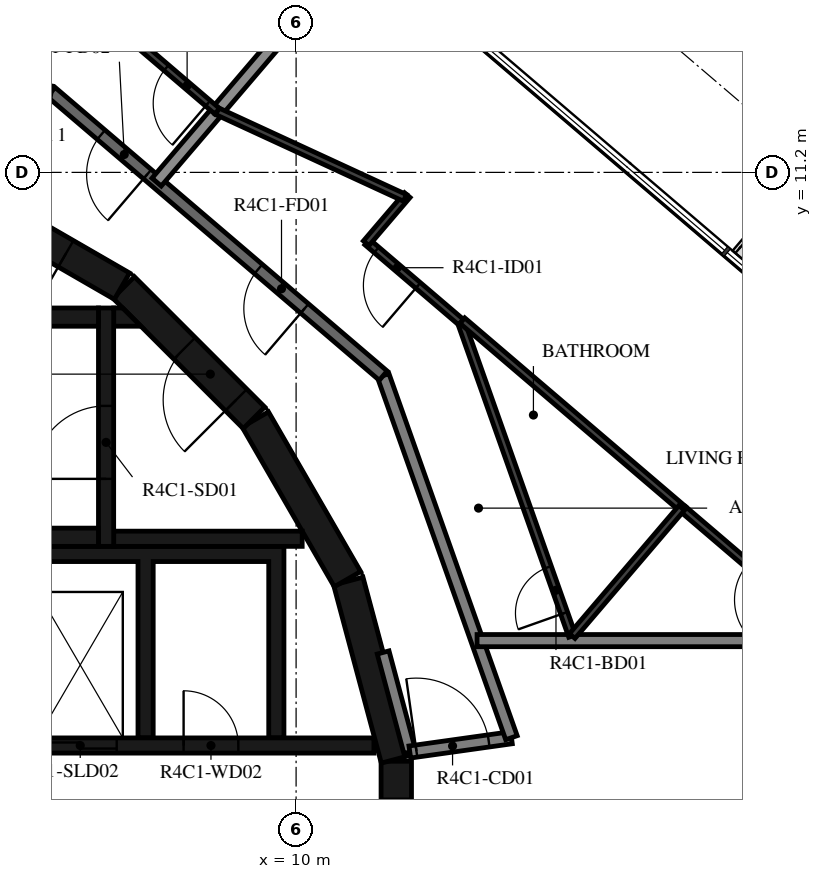
"""IFC4 building model, lengths in metres.
Left out: names, types, materials, properties, quantities, classifications, styles, units other than length and angle.
Written with IfcOpenShell. Run it as: python <this file> out.ifc"""

import sys

from ifc_helpers import new_model, si_unit, direction, frame, frame_2d, origin, place, context, subcontext, project, spatial, polyline, rectangle, outline, extrude, element, fill, save


model = new_model("IFC4")
c1 = context("Model", 3, precision=1e-05, world=origin(), true_north=direction((0.0, 1.0)))
c2 = subcontext(c1, "Body", "Model", "MODEL_VIEW")
j1 = project(units=[si_unit("LENGTHUNIT", "METRE"), si_unit("PLANEANGLEUNIT", "RADIAN")], contexts=[c1])
p1 = place(None, origin())
s1 = spatial("IfcSite", under=j1, at=p1, CompositionType="ELEMENT")
p2 = place(p1, origin())
s2 = spatial("IfcBuilding", under=s1, at=p2, CompositionType="ELEMENT")
p3 = place(p2, frame((0.0, 0.0, 176.2)))
s3 = spatial("IfcBuildingStorey", under=s2, at=p3, CompositionType="ELEMENT", Elevation=176.2)
p4 = place(p3, frame((11.647, -1.516, 0.0), z_axis=(0.0, 0.0, 1.0), x_axis=(0.0, 1.0, 0.0)))
e1 = element("IfcWall", 1, at=p4, inside=s3, PredefinedType="SHEAR", context=c2, shape_type="SweptSolid", body=[
    extrude(rectangle(XDim=3.033, YDim=0.5, at=frame_2d((1.516, 0.0))), origin(), (0.0, 0.0, 1.0), 3.12),
])
p5 = place(p4, frame((0.616, 0.0, 0.0)))
e2 = element("IfcOpeningElement", 2, at=p5, cuts=e1, PredefinedType="OPENING", context=c2, shape_type="SweptSolid", body=[
    extrude(rectangle(XDim=1.8, YDim=2.1, at=frame_2d((0.9, 1.05))), frame((0.0, 0.26, 0.0), z_axis=(0.0, -1.0, 0.0), x_axis=(1.0, 0.0, 0.0)), (0.0, 0.0, 1.0), 0.52),
])
for number, where, z_axis, x_axis in (
    (3, (11.643, 1.55, 0.0), (0.0, 0.0, 1.0), (-0.259, 0.966, 0.0)),
    (4, (10.845, 4.51, 0.0), (0.0, 0.0, 1.0), (-0.5, 0.866, 0.0)),
):
    element("IfcWall", number, at=place(p3, frame(where, z_axis=z_axis, x_axis=x_axis)), inside=s3, PredefinedType="SHEAR", context=c2, shape_type="SweptSolid", body=[
        extrude(rectangle(XDim=3.033, YDim=0.5, at=frame_2d((1.516, 0.0))), origin(), (0.0, 0.0, 1.0), 3.12),
    ])
p6 = place(p3, frame((9.308, 7.164, 0.0), z_axis=(0.0, 0.0, 1.0), x_axis=(-0.707106781187, 0.707106781187, 0.0)))
e5 = element("IfcWall", 5, at=p6, inside=s3, PredefinedType="SHEAR", context=c2, shape_type="SweptSolid", body=[
    extrude(rectangle(XDim=3.032, YDim=0.5, at=frame_2d((1.516, 0.0))), origin(), (0.0, 0.0, 1.0), 3.12),
])
p7 = place(p6, frame((0.416, 0.0, 0.0)))
e6 = element("IfcOpeningElement", 6, at=p7, cuts=e5, PredefinedType="OPENING", context=c2, shape_type="SweptSolid", body=[
    extrude(rectangle(XDim=1.2, YDim=2.1, at=frame_2d((0.6, 1.05))), frame((0.0, 0.26, 0.0), z_axis=(0.0, -1.0, 0.0), x_axis=(1.0, 0.0, 0.0)), (0.0, 0.0, 1.0), 0.52),
])
p8 = place(p3, frame((7.137, 9.329, 0.0), z_axis=(0.0, 0.0, 1.0), x_axis=(-0.865975092491, 0.500087131594, 0.0)))
e7 = element("IfcWall", 7, at=p8, inside=s3, PredefinedType="SHEAR", context=c2, shape_type="SweptSolid", body=[
    extrude(rectangle(XDim=3.033, YDim=0.5, at=frame_2d((1.516, 0.0))), origin(), (0.0, 0.0, 1.0), 3.12),
])
p9 = place(p8, frame((1.066, 0.0, 0.0)))
e8 = element("IfcOpeningElement", 8, at=p9, cuts=e7, PredefinedType="OPENING", context=c2, shape_type="SweptSolid", body=[
    extrude(rectangle(XDim=0.9, YDim=2.1, at=frame_2d((0.45, 1.05))), frame((0.0, 0.26, 0.0), z_axis=(0.0, -1.0, 0.0), x_axis=(1.0, 0.0, 0.0)), (0.0, 0.0, 1.0), 0.52),
])
for number, where, z_axis, x_axis in (
    (9, (0.0, 5.2, 0.0), (0.0, 0.0, 1.0), (1.0, 0.0, 0.0)),
    (10, (0.0, 8.82, 0.0), (0.0, 0.0, 1.0), (1.0, 0.0, 0.0)),
):
    element("IfcWall", number, at=place(p3, frame(where, z_axis=z_axis, x_axis=x_axis)), inside=s3, PredefinedType="SHEAR", context=c2, shape_type="SweptSolid", body=[
        extrude(rectangle(XDim=6.75, YDim=0.3, at=frame_2d((3.375, 0.0))), origin(), (0.0, 0.0, 1.0), 3.12),
    ])
p10 = place(p3, frame((6.875, 5.05, 0.0), z_axis=(0.0, 0.0, 1.0), x_axis=(0.0, 1.0, 0.0)))
e11 = element("IfcWall", 11, at=p10, inside=s3, PredefinedType="SHEAR", context=c2, shape_type="SweptSolid", body=[
    extrude(rectangle(XDim=3.92, YDim=0.25, at=frame_2d((1.96, 0.0))), origin(), (0.0, 0.0, 1.0), 3.12),
])
p11 = place(p10, frame((1.11, 0.0, 0.0)))
e12 = element("IfcOpeningElement", 12, at=p11, cuts=e11, PredefinedType="OPENING", context=c2, shape_type="SweptSolid", body=[
    extrude(rectangle(XDim=1.2, YDim=2.1, at=frame_2d((0.6, 1.05))), frame((0.0, 0.135, 0.0), z_axis=(0.0, -1.0, 0.0), x_axis=(1.0, 0.0, 0.0)), (0.0, 0.0, 1.0), 0.27),
])
p12 = place(p3, frame((7.0, 5.175, 0.0), z_axis=(0.0, 0.0, 1.0), x_axis=(1.0, 0.0, 0.0)))
e13 = element("IfcWall", 13, at=p12, inside=s3, PredefinedType="SHEAR", context=c2, shape_type="SweptSolid", body=[
    extrude(rectangle(XDim=3.1, YDim=0.25, at=frame_2d((1.55, 0.0))), origin(), (0.0, 0.0, 1.0), 3.12),
])
p13 = place(p3, origin())
e14 = element("IfcWall", 14, at=p13, inside=s3, PredefinedType="SHEAR", context=c2, shape_type="SweptSolid", body=[
    extrude(outline(polyline([(7.448, 8.67), (7.0, 8.67), (7.0, 8.97), (7.148, 8.97), (7.448, 8.67)])), origin(), (0.0, 0.0, 1.0), 3.12),
])
p14 = place(p3, origin())
e15 = element("IfcWall", 15, at=p14, inside=s3, PredefinedType="SHEAR", context=c2, shape_type="SweptSolid", body=[
    extrude(outline(polyline([(-9.55, 4.8), (-1.2, 4.8), (-1.2, 1.9), (-0.95, 1.9), (-0.95, 4.8), (0.95, 4.8), (0.95, 1.9), (1.2, 1.9), (1.2, 4.8), (3.1, 4.8), (3.1, 1.9), (3.35, 1.9), (3.35, 4.8), (5.25, 4.8), (5.25, 1.9), (5.5, 1.9), (5.5, 4.8), (7.4, 4.8), (7.4, 1.9), (7.65, 1.9), (7.65, 4.8), (9.55, 4.8), (9.55, 1.9), (9.8, 1.9), (9.8, 4.8), (9.8, 5.05), (-9.8, 5.05), (-9.8, 4.8), (-9.8, 1.9), (-9.55, 1.9), (-9.55, 4.8)])), origin(), (0.0, 0.0, 1.0), 3.12),
])
p15 = place(p3, frame((3.35, 1.775, 0.0), z_axis=(0.0, 0.0, 1.0), x_axis=(1.0, 0.0, 0.0)))
e16 = element("IfcWall", 16, at=p15, inside=s3, PredefinedType="SHEAR", context=c2, shape_type="SweptSolid", body=[
    extrude(rectangle(XDim=7.93, YDim=0.25, at=frame_2d((3.965, 0.0))), origin(), (0.0, 0.0, 1.0), 3.12),
])
p16 = place(p15, frame((0.35, 0.0, 0.0)))
e17 = element("IfcOpeningElement", 17, at=p16, cuts=e16, PredefinedType="OPENING", context=c2, shape_type="SweptSolid", body=[
    extrude(rectangle(XDim=1.2, YDim=2.4, at=frame_2d((0.6, 1.2))), frame((0.0, 0.135, 0.0), z_axis=(0.0, -1.0, 0.0), x_axis=(1.0, 0.0, 0.0)), (0.0, 0.0, 1.0), 0.27),
])
p17 = place(p15, frame((2.5, 0.0, 0.0)))
e18 = element("IfcOpeningElement", 18, at=p17, cuts=e16, PredefinedType="OPENING", context=c2, shape_type="SweptSolid", body=[
    extrude(rectangle(XDim=1.2, YDim=2.4, at=frame_2d((0.6, 1.2))), frame((0.0, 0.135, 0.0), z_axis=(0.0, -1.0, 0.0), x_axis=(1.0, 0.0, 0.0)), (0.0, 0.0, 1.0), 0.27),
])
p18 = place(p15, frame((4.8, 0.0, 0.0)))
e19 = element("IfcOpeningElement", 19, at=p18, cuts=e16, PredefinedType="OPENING", context=c2, shape_type="SweptSolid", body=[
    extrude(rectangle(XDim=0.9, YDim=2.1, at=frame_2d((0.45, 1.05))), frame((0.0, 0.135, 0.0), z_axis=(0.0, -1.0, 0.0), x_axis=(1.0, 0.0, 0.0)), (0.0, 0.0, 1.0), 0.27),
])
p19 = place(p3, frame((11.87, 1.668, 0.0), z_axis=(0.0, 0.0, 1.0), x_axis=(-0.258836880648, 0.965921047093, 0.0)))
e20 = element("IfcWall", 20, at=p19, inside=s3, PredefinedType="STANDARD", context=c2, shape_type="SweptSolid", body=[
    extrude(rectangle(XDim=1.695, YDim=0.2, at=frame_2d((0.848, 0.0))), origin(), (0.0, 0.0, 1.0), 3.12),
])
p20 = place(p3, frame((11.87, 1.668, 0.0), z_axis=(0.0, 0.0, 1.0), x_axis=(0.990270910415, 0.139152879904, 0.0)))
e21 = element("IfcWall", 21, at=p20, inside=s3, PredefinedType="STANDARD", context=c2, shape_type="SweptSolid", body=[
    extrude(rectangle(XDim=1.688, YDim=0.2, at=frame_2d((0.844, 0.0))), origin(), (0.0, 0.0, 1.0), 3.12),
])
p21 = place(p20, frame((0.11, 0.0, 0.0)))
e22 = element("IfcOpeningElement", 22, at=p21, cuts=e21, PredefinedType="OPENING", context=c2, shape_type="SweptSolid", body=[
    extrude(rectangle(XDim=1.2, YDim=2.1, at=frame_2d((0.6, 1.05))), frame((0.0, 0.11, 0.0), z_axis=(0.0, -1.0, 0.0), x_axis=(1.0, 0.0, 0.0)), (0.0, 0.0, 1.0), 0.22),
])
p22 = place(p3, frame((13.542, 1.903, 0.0), z_axis=(0.0, 0.0, 1.0), x_axis=(-0.333808508206, 0.942640907159, 0.0)))
e23 = element("IfcWall", 23, at=p22, inside=s3, PredefinedType="STANDARD", context=c2, shape_type="SweptSolid", body=[
    extrude(rectangle(XDim=6.317, YDim=0.2, at=frame_2d((3.158, 0.0))), origin(), (0.0, 0.0, 1.0), 3.12),
])
p23 = place(p3, frame((11.433, 7.858, 0.0), z_axis=(0.0, 0.0, 1.0), x_axis=(-0.760412154545, 0.649440801937, 0.0)))
e24 = element("IfcWall", 24, at=p23, inside=s3, PredefinedType="STANDARD", context=c2, shape_type="SweptSolid", body=[
    extrude(rectangle(XDim=7.181, YDim=0.2, at=frame_2d((3.59, 0.0))), origin(), (0.0, 0.0, 1.0), 3.12),
])
p24 = place(p23, frame((1.7, 0.0, 0.0)))
e25 = element("IfcOpeningElement", 25, at=p24, cuts=e24, PredefinedType="OPENING", context=c2, shape_type="SweptSolid", body=[
    extrude(rectangle(XDim=1.0, YDim=2.1, at=frame_2d((0.5, 1.05))), frame((0.0, 0.11, 0.0), z_axis=(0.0, -1.0, 0.0), x_axis=(1.0, 0.0, 0.0)), (0.0, 0.0, 1.0), 0.22),
])
p25 = place(p23, frame((5.101, 0.0, 0.0)))
e26 = element("IfcOpeningElement", 26, at=p25, cuts=e24, PredefinedType="OPENING", context=c2, shape_type="SweptSolid", body=[
    extrude(rectangle(XDim=1.0, YDim=2.1, at=frame_2d((0.5, 1.05))), frame((0.0, 0.11, 0.0), z_axis=(0.0, -1.0, 0.0), x_axis=(1.0, 0.0, 0.0)), (0.0, 0.0, 1.0), 0.22),
])
p26 = place(p3, frame((17.9, 3.5, 0.0), z_axis=(0.0, 0.0, 1.0), x_axis=(-1.0, 0.0, 0.0)))
e27 = element("IfcWall", 27, at=p26, inside=s3, PredefinedType="STANDARD", context=c2, shape_type="SweptSolid", body=[
    extrude(rectangle(XDim=4.924, YDim=0.2, at=frame_2d((2.462, 0.0))), origin(), (0.0, 0.0, 1.0), 3.12),
])
p27 = place(p3, frame((11.04, 14.943, 0.0), z_axis=(0.0, 0.0, 1.0), x_axis=(-0.649442880087, -0.760410379666, 0.0)))
e28 = element("IfcWall", 28, at=p27, inside=s3, PredefinedType="STANDARD", context=c2, shape_type="SweptSolid", body=[
    extrude(rectangle(XDim=5.133, YDim=0.2, at=frame_2d((2.566, 0.0))), origin(), (0.0, 0.0, 1.0), 2.73),
])
p28 = place(p3, frame((14.541, 3.575, 0.0), z_axis=(0.0, 0.0, 1.0), x_axis=(-0.333799280318, 0.942644174893, 0.0)))
e29 = element("IfcWall", 29, at=p28, inside=s3, PredefinedType="PARTITIONING", context=c2, shape_type="SweptSolid", body=[
    extrude(rectangle(XDim=5.477, YDim=0.12, at=frame_2d((2.738, 0.0))), origin(), (0.0, 0.0, 1.0), 3.12),
])
p29 = place(p28, frame((0.4, 0.0, 0.0)))
e30 = element("IfcOpeningElement", 30, at=p29, cuts=e29, PredefinedType="OPENING", context=c2, shape_type="SweptSolid", body=[
    extrude(rectangle(XDim=0.8, YDim=2.1, at=frame_2d((0.4, 1.05))), frame((0.0, 0.07, 0.0), z_axis=(0.0, -1.0, 0.0), x_axis=(1.0, 0.0, 0.0)), (0.0, 0.0, 1.0), 0.14),
])
p30 = place(p3, frame((12.713, 8.737, 0.0), z_axis=(0.0, 0.0, 1.0), x_axis=(-0.760410825807, 0.649442357716, 0.0)))
e31 = element("IfcWall", 31, at=p30, inside=s3, PredefinedType="PARTITIONING", context=c2, shape_type="SweptSolid", body=[
    extrude(rectangle(XDim=2.029, YDim=0.12, at=frame_2d((1.014, 0.0))), origin(), (0.0, 0.0, 1.0), 3.12),
])
p31 = place(p30, frame((0.929, 0.0, 0.0)))
e32 = element("IfcOpeningElement", 32, at=p31, cuts=e31, PredefinedType="OPENING", context=c2, shape_type="SweptSolid", body=[
    extrude(rectangle(XDim=0.9, YDim=2.1, at=frame_2d((0.45, 1.05))), frame((0.0, 0.07, 0.0), z_axis=(0.0, -1.0, 0.0), x_axis=(1.0, 0.0, 0.0)), (0.0, 0.0, 1.0), 0.14),
])
p32 = place(p3, frame((12.734, 8.762, 0.0), z_axis=(0.0, 0.0, 1.0), x_axis=(0.760390484255, -0.649466174219, 0.0)))
e33 = element("IfcWall", 33, at=p32, inside=s3, PredefinedType="PARTITIONING", context=c2, shape_type="SweptSolid", body=[
    extrude(rectangle(XDim=4.783, YDim=0.12, at=frame_2d((2.391, 0.0))), origin(), (0.0, 0.0, 1.0), 3.12),
])
p33 = place(p3, frame((11.153, 10.034, 0.0), z_axis=(0.0, 0.0, 1.0), x_axis=(0.649381401329, 0.760462882466, 0.0)))
e34 = element("IfcWall", 34, at=p33, inside=s3, PredefinedType="PARTITIONING", context=c2, shape_type="SweptSolid", body=[
    extrude(rectangle(XDim=1.042, YDim=0.12, at=frame_2d((0.521, 0.0))), origin(), (0.0, 0.0, 1.0), 3.12),
])
p34 = place(p3, frame((11.79, 10.781, 0.0), z_axis=(0.0, 0.0, 1.0), x_axis=(-0.907999296286, 0.418971691101, 0.0)))
e35 = element("IfcWall", 35, at=p34, inside=s3, PredefinedType="PARTITIONING", context=c2, shape_type="SweptSolid", body=[
    extrude(rectangle(XDim=3.401, YDim=0.12, at=frame_2d((1.701, 0.0))), origin(), (0.0, 0.0, 1.0), 3.12),
])
p35 = place(p3, frame((23.411, -0.357, 0.0), z_axis=(0.0, 0.0, 1.0), x_axis=(-0.76041871148, 0.649433124525, 0.0)))
e36 = element("IfcWall", 36, at=p35, inside=s3, PredefinedType="PARTITIONING", context=c2, shape_type="SweptSolid", body=[
    extrude(rectangle(XDim=9.259, YDim=0.12, at=frame_2d((4.629, 0.0))), origin(), (0.0, 0.0, 1.0), 3.12),
])
p36 = place(p35, frame((6.972, 0.0, 0.0)))
e37 = element("IfcOpeningElement", 37, at=p36, cuts=e36, PredefinedType="OPENING", context=c2, shape_type="SweptSolid", body=[
    extrude(rectangle(XDim=0.9, YDim=2.1, at=frame_2d((0.45, 1.05))), frame((0.0, 0.07, 0.0), z_axis=(0.0, -1.0, 0.0), x_axis=(1.0, 0.0, 0.0)), (0.0, 0.0, 1.0), 0.14),
])
p37 = place(p35, frame((0.2, 0.0, 0.0)))
e38 = element("IfcOpeningElement", 38, at=p37, cuts=e36, PredefinedType="OPENING", context=c2, shape_type="SweptSolid", body=[
    extrude(rectangle(XDim=0.9, YDim=2.1, at=frame_2d((0.45, 1.05))), frame((0.0, 0.07, 0.0), z_axis=(0.0, -1.0, 0.0), x_axis=(1.0, 0.0, 0.0)), (0.0, 0.0, 1.0), 0.14),
])
p38 = place(p3, frame((16.341, 5.682, 0.0), z_axis=(0.0, 0.0, 1.0), x_axis=(-0.64946993237, -0.76038727432, 0.0)))
e39 = element("IfcWall", 39, at=p38, inside=s3, PredefinedType="PARTITIONING", context=c2, shape_type="SweptSolid", body=[
    extrude(rectangle(XDim=2.771, YDim=0.12, at=frame_2d((1.386, 0.0))), origin(), (0.0, 0.0, 1.0), 3.12),
])
p39 = place(p3, frame((8.702, 12.206, 0.0), z_axis=(0.0, 0.0, 1.0), x_axis=(-0.760401313718, 0.649453494945, 0.0)))
e40 = element("IfcWall", 40, at=p39, inside=s3, PredefinedType="PARTITIONING", context=c2, shape_type="SweptSolid", body=[
    extrude(rectangle(XDim=16.724, YDim=0.12, at=frame_2d((8.362, 0.0))), origin(), (0.0, 0.0, 1.0), 3.12),
])
p40 = place(p39, frame((0.2, 0.0, 0.0)))
e41 = element("IfcOpeningElement", 41, at=p40, cuts=e40, PredefinedType="OPENING", context=c2, shape_type="SweptSolid", body=[
    extrude(rectangle(XDim=0.9, YDim=2.1, at=frame_2d((0.45, 1.05))), frame((0.0, 0.07, 0.0), z_axis=(0.0, -1.0, 0.0), x_axis=(1.0, 0.0, 0.0)), (0.0, 0.0, 1.0), 0.14),
])
p41 = place(p39, frame((8.02, 0.0, 0.0)))
e42 = element("IfcOpeningElement", 42, at=p41, cuts=e40, PredefinedType="OPENING", context=c2, shape_type="SweptSolid", body=[
    extrude(rectangle(XDim=0.9, YDim=2.1, at=frame_2d((0.45, 1.05))), frame((0.0, 0.07, 0.0), z_axis=(0.0, -1.0, 0.0), x_axis=(1.0, 0.0, 0.0)), (0.0, 0.0, 1.0), 0.14),
])
p42 = place(p39, frame((14.412, 0.0, 0.0)))
e43 = element("IfcOpeningElement", 43, at=p42, cuts=e40, PredefinedType="OPENING", context=c2, shape_type="SweptSolid", body=[
    extrude(rectangle(XDim=0.9, YDim=2.1, at=frame_2d((0.45, 1.05))), frame((0.0, 0.07, 0.0), z_axis=(0.0, -1.0, 0.0), x_axis=(1.0, 0.0, 0.0)), (0.0, 0.0, 1.0), 0.14),
])
p43 = place(p11, origin())
e44 = element("IfcDoor", 44, at=p43, inside=s3, OperationType="SINGLE_SWING_LEFT", PredefinedType="DOOR", context=c2, shape_type="SweptSolid", body=[
    extrude(rectangle(XDim=1.2, YDim=2.1, at=frame_2d((0.6, 1.05))), frame((0.0, 0.025, 0.0), z_axis=(0.0, -1.0, 0.0), x_axis=(1.0, 0.0, 0.0)), (0.0, 0.0, 1.0), 0.05),
])
fill(e12, e44)
p44 = place(p7, origin())
e45 = element("IfcDoor", 45, at=p44, inside=s3, OperationType="SINGLE_SWING_RIGHT", PredefinedType="DOOR", context=c2, shape_type="SweptSolid", body=[
    extrude(rectangle(XDim=1.2, YDim=2.1, at=frame_2d((0.6, 1.05))), frame((0.0, 0.025, 0.0), z_axis=(0.0, -1.0, 0.0), x_axis=(1.0, 0.0, 0.0)), (0.0, 0.0, 1.0), 0.05),
])
fill(e6, e45)
p45 = place(p17, origin())
e46 = element("IfcDoor", 46, at=p45, inside=s3, OperationType="DOUBLE_DOOR_SLIDING", PredefinedType="DOOR", context=c2, shape_type="SweptSolid", body=[
    extrude(rectangle(XDim=1.2, YDim=2.4, at=frame_2d((0.6, 1.2))), frame((0.0, 0.025, 0.0), z_axis=(0.0, -1.0, 0.0), x_axis=(1.0, 0.0, 0.0)), (0.0, 0.0, 1.0), 0.05),
])
fill(e18, e46)
p46 = place(p18, origin())
e47 = element("IfcDoor", 47, at=p46, inside=s3, OperationType="SINGLE_SWING_RIGHT", PredefinedType="DOOR", context=c2, shape_type="SweptSolid", body=[
    extrude(rectangle(XDim=0.9, YDim=2.1, at=frame_2d((0.45, 1.05))), frame((0.0, 0.025, 0.0), z_axis=(0.0, -1.0, 0.0), x_axis=(1.0, 0.0, 0.0)), (0.0, 0.0, 1.0), 0.05),
])
fill(e19, e47)
p47 = place(p9, origin())
e48 = element("IfcDoor", 48, at=p47, inside=s3, OperationType="SINGLE_SWING_LEFT", PredefinedType="DOOR", context=c2, shape_type="SweptSolid", body=[
    extrude(rectangle(XDim=0.9, YDim=2.1, at=frame_2d((0.45, 1.05))), frame((0.0, 0.025, 0.0), z_axis=(0.0, -1.0, 0.0), x_axis=(1.0, 0.0, 0.0)), (0.0, 0.0, 1.0), 0.05),
])
fill(e8, e48)
p48 = place(p24, origin())
e49 = element("IfcDoor", 49, at=p48, inside=s3, OperationType="SINGLE_SWING_LEFT", PredefinedType="DOOR", context=c2, shape_type="SweptSolid", body=[
    extrude(rectangle(XDim=1.0, YDim=2.1, at=frame_2d((0.5, 1.05))), frame((0.0, 0.025, 0.0), z_axis=(0.0, -1.0, 0.0), x_axis=(1.0, 0.0, 0.0)), (0.0, 0.0, 1.0), 0.05),
])
fill(e25, e49)
p49 = place(p29, origin())
e50 = element("IfcDoor", 50, at=p49, inside=s3, OperationType="SINGLE_SWING_LEFT", PredefinedType="DOOR", context=c2, shape_type="SweptSolid", body=[
    extrude(rectangle(XDim=0.8, YDim=2.1, at=frame_2d((0.4, 1.05))), frame((0.0, 0.025, 0.0), z_axis=(0.0, -1.0, 0.0), x_axis=(1.0, 0.0, 0.0)), (0.0, 0.0, 1.0), 0.05),
])
fill(e30, e50)
p50 = place(p31, origin())
e51 = element("IfcDoor", 51, at=p50, inside=s3, OperationType="SINGLE_SWING_LEFT", PredefinedType="DOOR", context=c2, shape_type="SweptSolid", body=[
    extrude(rectangle(XDim=0.9, YDim=2.1, at=frame_2d((0.45, 1.05))), frame((0.0, 0.025, 0.0), z_axis=(0.0, -1.0, 0.0), x_axis=(1.0, 0.0, 0.0)), (0.0, 0.0, 1.0), 0.05),
])
fill(e32, e51)
p51 = place(p25, origin())
e52 = element("IfcDoor", 52, at=p51, inside=s3, OperationType="SINGLE_SWING_RIGHT", PredefinedType="DOOR", context=c2, shape_type="SweptSolid", body=[
    extrude(rectangle(XDim=1.0, YDim=2.1, at=frame_2d((0.5, 1.05))), frame((0.0, 0.025, 0.0), z_axis=(0.0, -1.0, 0.0), x_axis=(1.0, 0.0, 0.0)), (0.0, 0.0, 1.0), 0.05),
])
fill(e26, e52)
p52 = place(p40, origin())
e53 = element("IfcDoor", 53, at=p52, inside=s3, OperationType="SINGLE_SWING_RIGHT", PredefinedType="DOOR", context=c2, shape_type="SweptSolid", body=[
    extrude(rectangle(XDim=0.9, YDim=2.1, at=frame_2d((0.45, 1.05))), frame((0.0, 0.025, 0.0), z_axis=(0.0, -1.0, 0.0), x_axis=(1.0, 0.0, 0.0)), (0.0, 0.0, 1.0), 0.05),
])
fill(e41, e53)
p53 = place(p21, origin())
e54 = element("IfcDoor", 54, at=p53, inside=s3, OperationType="DOUBLE_DOOR_SINGLE_SWING", PredefinedType="DOOR", context=c2, shape_type="SweptSolid", body=[
    extrude(rectangle(XDim=1.2, YDim=2.1, at=frame_2d((0.6, 1.05))), frame((0.0, 0.025, 0.0), z_axis=(0.0, -1.0, 0.0), x_axis=(1.0, 0.0, 0.0)), (0.0, 0.0, 1.0), 0.05),
])
fill(e22, e54)
save(model, sys.argv[1])
